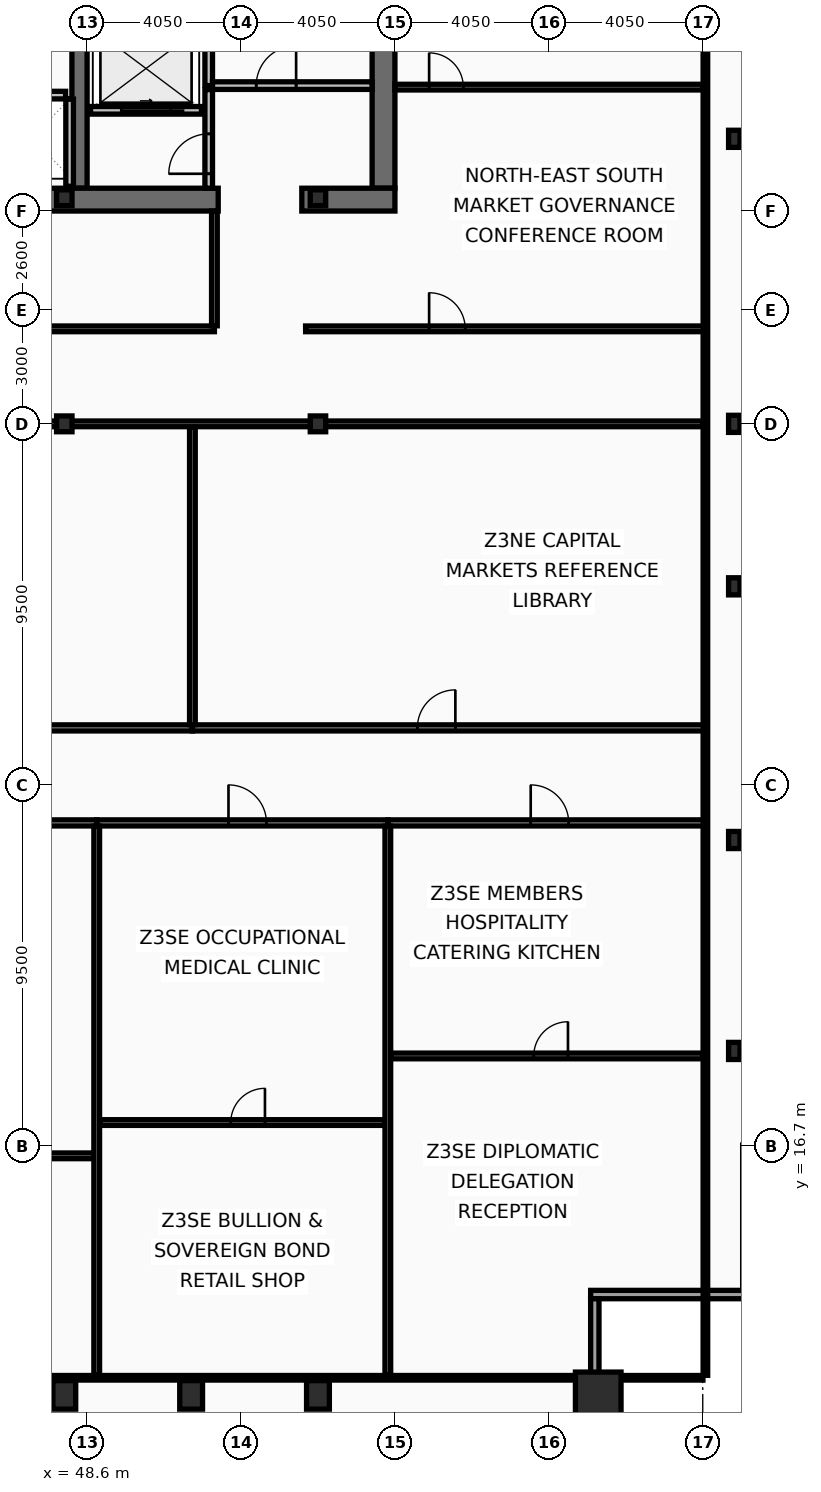
"""IFC4 building model, lengths in metres.
Left out: names, types, materials, properties, quantities, classifications, styles, units other than length and angle.
Written with IfcOpenShell. Run it as: python <this file> out.ifc"""

import sys

from ifc_helpers import new_model, si_unit, direction, frame, frame_2d, origin, origin_2d, place, context, subcontext, project, spatial, rectangle, hollow_rectangle, i_section, extrude, element, fill, save


model = new_model("IFC4")
c1 = context("Model", 3, precision=1e-05, world=origin(), true_north=direction((0.0, 1.0)))
c2 = subcontext(c1, "Body", "Model", "MODEL_VIEW")
j1 = project(units=[si_unit("LENGTHUNIT", "METRE"), si_unit("PLANEANGLEUNIT", "RADIAN")], contexts=[c1])
p1 = place(None, origin())
s1 = spatial("IfcSite", under=j1, at=p1, CompositionType="ELEMENT")
p2 = place(p1, origin())
s2 = spatial("IfcBuilding", under=s1, at=p2, CompositionType="ELEMENT")
p3 = place(p2, frame((0.0, 0.0, 231.8)))
s3 = spatial("IfcBuildingStorey", under=s2, at=p3, CompositionType="ELEMENT", Elevation=231.8)
p4 = place(p3, frame((56.4, 53.1, 0.0), z_axis=(0.0, 0.0, 1.0), x_axis=(0.0, -1.0, 0.0)))
e1 = element("IfcWall", 1, at=p4, inside=s3, PredefinedType="SHEAR", context=c2, shape_type="SweptSolid", body=[
    extrude(rectangle(XDim=11.2, YDim=0.6, at=frame_2d((5.6, 0.0))), origin(), (0.0, 0.0, 1.0), 3.44),
])
p5 = place(p3, frame((48.4, 41.9, 0.0), z_axis=(0.0, 0.0, 1.0), x_axis=(0.0, 1.0, 0.0)))
e2 = element("IfcWall", 2, at=p5, inside=s3, PredefinedType="SHEAR", context=c2, shape_type="SweptSolid", body=[
    extrude(rectangle(XDim=11.2, YDim=0.4, at=frame_2d((5.6, 0.0))), origin(), (0.0, 0.0, 1.0), 3.44),
])
p6 = place(p3, frame((52.05, 41.6, 0.0), z_axis=(0.0, 0.0, 1.0), x_axis=(-1.0, 0.0, 0.0)))
e3 = element("IfcWall", 3, at=p6, inside=s3, PredefinedType="SHEAR", context=c2, shape_type="SweptSolid", body=[
    extrude(rectangle(XDim=11.3, YDim=0.6, at=frame_2d((5.65, 0.0))), origin(), (0.0, 0.0, 1.0), 3.44),
])
p7 = place(p3, frame((56.7, 41.6, 0.0), z_axis=(0.0, 0.0, 1.0), x_axis=(-1.0, 0.0, 0.0)))
e4 = element("IfcWall", 4, at=p7, inside=s3, PredefinedType="SHEAR", context=c2, shape_type="SweptSolid", body=[
    extrude(rectangle(XDim=2.45, YDim=0.6, at=frame_2d((1.225, 0.0))), origin(), (0.0, 0.0, 1.0), 3.44),
])
p8 = place(p3, frame((62.05, 10.15, 0.0), z_axis=(0.0, 0.0, 1.0), x_axis=(1.0, 0.0, 0.0)))
e5 = element("IfcColumn", 5, at=p8, inside=s3, PredefinedType="COLUMN", context=c2, shape_type="SweptSolid", body=[
    extrude(hollow_rectangle(XDim=1.2, YDim=1.2, WallThickness=0.06, at=origin_2d()), origin(), (0.0, 0.0, 1.0), 3.6),
])
for number, where, z_axis, x_axis in (
    (6, (48.0, 10.15, 0.0), (0.0, 0.0, 1.0), (1.0, 0.0, 0.0)),
    (7, (51.337, 10.15, 0.0), (0.0, 0.0, 1.0), (1.0, 0.0, 0.0)),
    (8, (54.675, 10.15, 0.0), (0.0, 0.0, 1.0), (1.0, 0.0, 0.0)),
):
    element("IfcColumn", number, at=place(p3, frame(where, z_axis=z_axis, x_axis=x_axis)), inside=s3, PredefinedType="COLUMN", context=c2, shape_type="SweptSolid", body=[
        extrude(hollow_rectangle(XDim=0.6, YDim=0.75, WallThickness=0.045, at=origin_2d()), origin(), (0.0, 0.0, 1.0), 3.6),
    ])
for number, where, z_axis, x_axis in (
    (9, (65.63, 19.2, 0.0), (0.0, 0.0, 1.0), (1.0, 0.0, 0.0)),
    (10, (65.63, 24.75, 0.0), (0.0, 0.0, 1.0), (1.0, 0.0, 0.0)),
    (11, (65.63, 31.425, 0.0), (0.0, 0.0, 1.0), (1.0, 0.0, 0.0)),
    (12, (65.63, 35.7, 0.0), (0.0, 0.0, 1.0), (1.0, 0.0, 0.0)),
    (13, (65.63, 43.2, 0.0), (0.0, 0.0, 1.0), (1.0, 0.0, 0.0)),
):
    element("IfcColumn", number, at=place(p3, frame(where, z_axis=z_axis, x_axis=x_axis)), inside=s3, PredefinedType="COLUMN", context=c2, shape_type="SweptSolid", body=[
        extrude(i_section(OverallWidth=0.3, OverallDepth=0.45, WebThickness=0.014, FlangeThickness=0.026, at=origin_2d()), origin(), (0.0, 0.0, 1.0), 3.6),
    ])
for number, where, z_axis, x_axis in (
    (14, (48.0, 35.7, 0.0), (0.0, 0.0, 1.0), (1.0, 0.0, 0.0)),
    (15, (48.0, 41.65, 0.0), (0.0, 0.0, 1.0), (1.0, 0.0, 0.0)),
    (16, (54.675, 35.7, 0.0), (0.0, 0.0, 1.0), (1.0, 0.0, 0.0)),
    (17, (54.675, 41.65, 0.0), (0.0, 0.0, 1.0), (1.0, 0.0, 0.0)),
):
    element("IfcColumn", number, at=place(p3, frame(where, z_axis=z_axis, x_axis=x_axis)), inside=s3, PredefinedType="COLUMN", context=c2, shape_type="SweptSolid", body=[
        extrude(i_section(OverallWidth=0.406, OverallDepth=0.416, WebThickness=0.03, FlangeThickness=0.048, at=origin_2d()), origin(), (0.0, 0.0, 1.0), 3.6),
    ])
p9 = place(p3, frame((66.07, 12.79, 0.0), z_axis=(0.0, 0.0, 1.0), x_axis=(-1.0, 0.0, 0.0)))
e18 = element("IfcWall", 18, at=p9, inside=s3, PredefinedType="SOLIDWALL", context=c2, shape_type="SweptSolid", body=[
    extrude(rectangle(XDim=4.22, YDim=0.22, at=frame_2d((2.11, 0.0))), origin(), (0.0, 0.0, 1.0), 2.83),
])
p10 = place(p3, frame((61.96, 12.68, 0.0), z_axis=(0.0, 0.0, 1.0), x_axis=(0.0, -1.0, 0.0)))
e19 = element("IfcWall", 19, at=p10, inside=s3, PredefinedType="SOLIDWALL", context=c2, shape_type="SweptSolid", body=[
    extrude(rectangle(XDim=3.91, YDim=0.22, at=frame_2d((1.955, 0.0))), origin(), (0.0, 0.0, 1.0), 2.83),
])
p11 = place(p3, frame((51.61, 43.95, 0.0), z_axis=(0.0, 0.0, 1.0), x_axis=(-1.0, 0.0, 0.0)))
e20 = element("IfcWall", 20, at=p11, inside=s3, PredefinedType="PARTITIONING", context=c2, shape_type="SweptSolid", body=[
    extrude(rectangle(XDim=2.92, YDim=0.2, at=frame_2d((1.46, 0.0))), origin(), (0.0, 0.0, 1.0), 3.44),
])
p12 = place(p11, frame((0.81, 0.0, 0.0)))
e21 = element("IfcOpeningElement", 21, at=p12, cuts=e20, PredefinedType="OPENING", context=c2, shape_type="SweptSolid", body=[
    extrude(rectangle(XDim=1.3, YDim=2.18, at=frame_2d((0.65, 1.09))), frame((0.0, 0.11, 0.0), z_axis=(0.0, -1.0, 0.0), x_axis=(1.0, 0.0, 0.0)), (0.0, 0.0, 1.0), 0.22),
])
p13 = place(p3, frame((51.8, 44.6, 0.0), z_axis=(0.0, 0.0, 1.0), x_axis=(0.0, 1.0, 0.0)))
e22 = element("IfcWall", 22, at=p13, inside=s3, PredefinedType="PARTITIONING", context=c2, shape_type="SweptSolid", body=[
    extrude(rectangle(XDim=4.3, YDim=0.2, at=frame_2d((2.15, 0.0))), origin(), (0.0, 0.0, 1.0), 3.44),
])
p14 = place(p3, frame((51.9, 44.6, 0.0), z_axis=(0.0, 0.0, 1.0), x_axis=(1.0, 0.0, 0.0)))
e23 = element("IfcWall", 23, at=p14, inside=s3, PredefinedType="PARTITIONING", context=c2, shape_type="SweptSolid", body=[
    extrude(rectangle(XDim=4.2, YDim=0.2, at=frame_2d((2.1, 0.0))), origin(), (0.0, 0.0, 1.0), 3.44),
])
p15 = place(p14, frame((1.15, 0.0, 0.0)))
e24 = element("IfcOpeningElement", 24, at=p15, cuts=e23, PredefinedType="OPENING", context=c2, shape_type="SweptSolid", body=[
    extrude(rectangle(XDim=1.05, YDim=2.15, at=frame_2d((0.525, 1.075))), frame((0.0, 0.11, 0.0), z_axis=(0.0, -1.0, 0.0), x_axis=(1.0, 0.0, 0.0)), (0.0, 0.0, 1.0), 0.22),
])
p16 = place(p3, frame((51.8, 41.9, 0.0), z_axis=(0.0, 0.0, 1.0), x_axis=(0.0, 1.0, 0.0)))
e25 = element("IfcWall", 25, at=p16, inside=s3, PredefinedType="PARTITIONING", context=c2, shape_type="SweptSolid", body=[
    extrude(rectangle(XDim=2.595, YDim=0.2, at=frame_2d((1.298, 0.0))), origin(), (0.0, 0.0, 1.0), 3.44),
])
p17 = place(p16, frame((0.38, 0.0, 0.0)))
e26 = element("IfcOpeningElement", 26, at=p17, cuts=e25, PredefinedType="OPENING", context=c2, shape_type="SweptSolid", body=[
    extrude(rectangle(XDim=1.05, YDim=2.15, at=frame_2d((0.525, 1.075))), frame((0.0, 0.11, 0.0), z_axis=(0.0, -1.0, 0.0), x_axis=(1.0, 0.0, 0.0)), (0.0, 0.0, 1.0), 0.22),
])
p18 = place(p3, frame((41.825, 44.35, 0.0), z_axis=(0.0, 0.0, 1.0), x_axis=(1.0, 0.0, 0.0)))
e27 = element("IfcWall", 27, at=p18, inside=s3, PredefinedType="PARTITIONING", context=c2, shape_type="SweptSolid", body=[
    extrude(rectangle(XDim=6.21, YDim=0.2, at=frame_2d((3.105, 0.0))), origin(), (0.0, 0.0, 1.0), 3.44),
])
p19 = place(p3, frame((48.14, 41.95, 0.0), z_axis=(0.0, 0.0, 1.0), x_axis=(0.0, 1.0, 0.0)))
e28 = element("IfcWall", 28, at=p19, inside=s3, PredefinedType="PARTITIONING", context=c2, shape_type="SweptSolid", body=[
    extrude(rectangle(XDim=2.295, YDim=0.2, at=frame_2d((1.147, 0.0))), origin(), (0.0, 0.0, 1.0), 3.44),
])
p20 = place(p3, frame((44.8, 38.2, 0.0), z_axis=(0.0, 0.0, 1.0), x_axis=(1.0, 0.0, 0.0)))
e29 = element("IfcWall", 29, at=p20, inside=s3, PredefinedType="PARTITIONING", context=c2, shape_type="SweptSolid", body=[
    extrude(rectangle(XDim=7.15, YDim=0.15, at=frame_2d((3.575, 0.0))), origin(), (0.0, 0.0, 1.0), 2.78),
])
p21 = place(p20, frame((1.1, 0.0, 0.0)))
e30 = element("IfcOpeningElement", 30, at=p21, cuts=e29, PredefinedType="OPENING", context=c2, shape_type="SweptSolid", body=[
    extrude(rectangle(XDim=1.0, YDim=2.05, at=frame_2d((0.5, 1.025))), frame((0.0, 0.085, 0.0), z_axis=(0.0, -1.0, 0.0), x_axis=(1.0, 0.0, 0.0)), (0.0, 0.0, 1.0), 0.17),
])
p22 = place(p3, frame((51.95, 38.28, 0.0), z_axis=(0.0, 0.0, 1.0), x_axis=(0.0, 1.0, 0.0)))
e31 = element("IfcWall", 31, at=p22, inside=s3, PredefinedType="PARTITIONING", context=c2, shape_type="SweptSolid", body=[
    extrude(rectangle(XDim=3.02, YDim=0.15, at=frame_2d((1.51, 0.0))), origin(), (0.0, 0.0, 1.0), 3.44),
])
p23 = place(p3, frame((54.35, 38.2, 0.0), z_axis=(0.0, 0.0, 1.0), x_axis=(1.0, 0.0, 0.0)))
e32 = element("IfcWall", 32, at=p23, inside=s3, PredefinedType="PARTITIONING", context=c2, shape_type="SweptSolid", body=[
    extrude(rectangle(XDim=10.52, YDim=0.15, at=frame_2d((5.26, 0.0))), origin(), (0.0, 0.0, 1.0), 2.78),
])
p24 = place(p23, frame((3.25, 0.0, 0.0)))
e33 = element("IfcOpeningElement", 33, at=p24, cuts=e32, PredefinedType="OPENING", context=c2, shape_type="SweptSolid", body=[
    extrude(rectangle(XDim=0.95, YDim=2.05, at=frame_2d((0.475, 1.025))), frame((0.0, 0.085, 0.0), z_axis=(0.0, -1.0, 0.0), x_axis=(1.0, 0.0, 0.0)), (0.0, 0.0, 1.0), 0.17),
])
p25 = place(p3, frame((56.7, 44.56, 0.0), z_axis=(0.0, 0.0, 1.0), x_axis=(1.0, 0.0, 0.0)))
e34 = element("IfcWall", 34, at=p25, inside=s3, PredefinedType="PARTITIONING", context=c2, shape_type="SweptSolid", body=[
    extrude(rectangle(XDim=8.105, YDim=0.15, at=frame_2d((4.052, 0.0))), origin(), (0.0, 0.0, 1.0), 2.83),
])
p26 = place(p25, frame((0.9, 0.0, 0.0)))
e35 = element("IfcOpeningElement", 35, at=p26, cuts=e34, PredefinedType="OPENING", context=c2, shape_type="SweptSolid", body=[
    extrude(rectangle(XDim=0.9, YDim=2.05, at=frame_2d((0.45, 1.025))), frame((0.0, 0.085, 0.0), z_axis=(0.0, -1.0, 0.0), x_axis=(1.0, 0.0, 0.0)), (0.0, 0.0, 1.0), 0.17),
])
p27 = place(p3, frame((39.88, 35.7, 0.0), z_axis=(0.0, 0.0, 1.0), x_axis=(1.0, 0.0, 0.0)))
e36 = element("IfcWall", 36, at=p27, inside=s3, PredefinedType="PARTITIONING", context=c2, shape_type="SweptSolid", body=[
    extrude(rectangle(XDim=24.925, YDim=0.15, at=frame_2d((12.462, 0.0))), origin(), (0.0, 0.0, 1.0), 2.78),
])
p28 = place(p3, frame((39.8, 25.2, 0.0), z_axis=(0.0, 0.0, 1.0), x_axis=(1.0, 0.0, 0.0)))
e37 = element("IfcWall", 37, at=p28, inside=s3, PredefinedType="PARTITIONING", context=c2, shape_type="SweptSolid", body=[
    extrude(rectangle(XDim=9.053, YDim=0.16, at=frame_2d((4.526, 0.0))), origin(), (0.0, 0.0, 1.0), 2.78),
])
p29 = place(p28, frame((4.052, 0.0, 0.0)))
e38 = element("IfcOpeningElement", 38, at=p29, cuts=e37, PredefinedType="OPENING", context=c2, shape_type="SweptSolid", body=[
    extrude(rectangle(XDim=1.0, YDim=2.05, at=frame_2d((0.5, 1.025))), frame((0.0, 0.09, 0.0), z_axis=(0.0, -1.0, 0.0), x_axis=(1.0, 0.0, 0.0)), (0.0, 0.0, 1.0), 0.18),
])
p30 = place(p3, frame((39.88, 16.44, 0.0), z_axis=(0.0, 0.0, 1.0), x_axis=(1.0, 0.0, 0.0)))
e39 = element("IfcWall", 39, at=p30, inside=s3, PredefinedType="PARTITIONING", context=c2, shape_type="SweptSolid", body=[
    extrude(rectangle(XDim=8.893, YDim=0.15, at=frame_2d((4.447, 0.0))), origin(), (0.0, 0.0, 1.0), 2.78),
])
p31 = place(p30, frame((4.074, 0.0, 0.0)))
e40 = element("IfcOpeningElement", 40, at=p31, cuts=e39, PredefinedType="OPENING", context=c2, shape_type="SweptSolid", body=[
    extrude(rectangle(XDim=0.9, YDim=2.05, at=frame_2d((0.45, 1.025))), frame((0.0, 0.085, 0.0), z_axis=(0.0, -1.0, 0.0), x_axis=(1.0, 0.0, 0.0)), (0.0, 0.0, 1.0), 0.17),
])
p32 = place(p3, frame((48.853, 25.2, 0.0), z_axis=(0.0, 0.0, 1.0), x_axis=(1.0, 0.0, 0.0)))
e41 = element("IfcWall", 41, at=p32, inside=s3, PredefinedType="PARTITIONING", context=c2, shape_type="SweptSolid", body=[
    extrude(rectangle(XDim=7.66, YDim=0.16, at=frame_2d((3.83, 0.0))), origin(), (0.0, 0.0, 1.0), 2.78),
])
p33 = place(p32, frame((3.467, 0.0, 0.0)))
e42 = element("IfcOpeningElement", 42, at=p33, cuts=e41, PredefinedType="OPENING", context=c2, shape_type="SweptSolid", body=[
    extrude(rectangle(XDim=1.0, YDim=2.05, at=frame_2d((0.5, 1.025))), frame((0.0, 0.09, 0.0), z_axis=(0.0, -1.0, 0.0), x_axis=(1.0, 0.0, 0.0)), (0.0, 0.0, 1.0), 0.18),
])
p34 = place(p3, frame((48.853, 10.665, 0.0), z_axis=(0.0, 0.0, 1.0), x_axis=(0.0, 1.0, 0.0)))
e43 = element("IfcWall", 43, at=p34, inside=s3, PredefinedType="PARTITIONING", context=c2, shape_type="SweptSolid", body=[
    extrude(rectangle(XDim=14.45, YDim=0.15, at=frame_2d((7.225, 0.0))), origin(), (0.0, 0.0, 1.0), 2.98),
])
p35 = place(p3, frame((48.933, 17.316, 0.0), z_axis=(0.0, 0.0, 1.0), x_axis=(1.0, 0.0, 0.0)))
e44 = element("IfcWall", 44, at=p35, inside=s3, PredefinedType="PARTITIONING", context=c2, shape_type="SweptSolid", body=[
    extrude(rectangle(XDim=7.5, YDim=0.15, at=frame_2d((3.75, 0.0))), origin(), (0.0, 0.0, 1.0), 2.78),
])
p36 = place(p35, frame((3.447, 0.0, 0.0)))
e45 = element("IfcOpeningElement", 45, at=p36, cuts=e44, PredefinedType="OPENING", context=c2, shape_type="SweptSolid", body=[
    extrude(rectangle(XDim=0.9, YDim=2.05, at=frame_2d((0.45, 1.025))), frame((0.0, 0.085, 0.0), z_axis=(0.0, -1.0, 0.0), x_axis=(1.0, 0.0, 0.0)), (0.0, 0.0, 1.0), 0.17),
])
p37 = place(p3, frame((56.513, 25.2, 0.0), z_axis=(0.0, 0.0, 1.0), x_axis=(1.0, 0.0, 0.0)))
e46 = element("IfcWall", 46, at=p37, inside=s3, PredefinedType="PARTITIONING", context=c2, shape_type="SweptSolid", body=[
    extrude(rectangle(XDim=8.357, YDim=0.16, at=frame_2d((4.178, 0.0))), origin(), (0.0, 0.0, 1.0), 3.44),
])
p38 = place(p37, frame((3.76, 0.0, 0.0)))
e47 = element("IfcOpeningElement", 47, at=p38, cuts=e46, PredefinedType="OPENING", context=c2, shape_type="SweptSolid", body=[
    extrude(rectangle(XDim=1.0, YDim=2.05, at=frame_2d((0.5, 1.025))), frame((0.0, 0.09, 0.0), z_axis=(0.0, -1.0, 0.0), x_axis=(1.0, 0.0, 0.0)), (0.0, 0.0, 1.0), 0.18),
])
p39 = place(p3, frame((56.513, 10.665, 0.0), z_axis=(0.0, 0.0, 1.0), x_axis=(0.0, 1.0, 0.0)))
e48 = element("IfcWall", 48, at=p39, inside=s3, PredefinedType="PARTITIONING", context=c2, shape_type="SweptSolid", body=[
    extrude(rectangle(XDim=14.45, YDim=0.15, at=frame_2d((7.225, 0.0))), origin(), (0.0, 0.0, 1.0), 2.78),
])
p40 = place(p3, frame((56.593, 19.068, 0.0), z_axis=(0.0, 0.0, 1.0), x_axis=(1.0, 0.0, 0.0)))
e49 = element("IfcWall", 49, at=p40, inside=s3, PredefinedType="PARTITIONING", context=c2, shape_type="SweptSolid", body=[
    extrude(rectangle(XDim=8.212, YDim=0.15, at=frame_2d((4.106, 0.0))), origin(), (0.0, 0.0, 1.0), 2.78),
])
p41 = place(p40, frame((3.76, 0.0, 0.0)))
e50 = element("IfcOpeningElement", 50, at=p41, cuts=e49, PredefinedType="OPENING", context=c2, shape_type="SweptSolid", body=[
    extrude(rectangle(XDim=0.9, YDim=2.05, at=frame_2d((0.45, 1.025))), frame((0.0, 0.085, 0.0), z_axis=(0.0, -1.0, 0.0), x_axis=(1.0, 0.0, 0.0)), (0.0, 0.0, 1.0), 0.17),
])
p42 = place(p3, frame((39.8, 27.7, 0.0), z_axis=(0.0, 0.0, 1.0), x_axis=(1.0, 0.0, 0.0)))
e51 = element("IfcWall", 51, at=p42, inside=s3, PredefinedType="PARTITIONING", context=c2, shape_type="SweptSolid", body=[
    extrude(rectangle(XDim=11.571, YDim=0.16, at=frame_2d((5.785, 0.0))), origin(), (0.0, 0.0, 1.0), 2.78),
])
p43 = place(p42, frame((5.11, 0.0, 0.0)))
e52 = element("IfcOpeningElement", 52, at=p43, cuts=e51, PredefinedType="OPENING", context=c2, shape_type="SweptSolid", body=[
    extrude(rectangle(XDim=1.0, YDim=2.05, at=frame_2d((0.5, 1.025))), frame((0.0, 0.09, 0.0), z_axis=(0.0, -1.0, 0.0), x_axis=(1.0, 0.0, 0.0)), (0.0, 0.0, 1.0), 0.18),
])
p44 = place(p3, frame((51.371, 27.7, 0.0), z_axis=(0.0, 0.0, 1.0), x_axis=(1.0, 0.0, 0.0)))
e53 = element("IfcWall", 53, at=p44, inside=s3, PredefinedType="PARTITIONING", context=c2, shape_type="SweptSolid", body=[
    extrude(rectangle(XDim=13.499, YDim=0.16, at=frame_2d((6.75, 0.0))), origin(), (0.0, 0.0, 1.0), 2.78),
])
p45 = place(p44, frame((5.92, 0.0, 0.0)))
e54 = element("IfcOpeningElement", 54, at=p45, cuts=e53, PredefinedType="OPENING", context=c2, shape_type="SweptSolid", body=[
    extrude(rectangle(XDim=1.0, YDim=2.05, at=frame_2d((0.5, 1.025))), frame((0.0, 0.09, 0.0), z_axis=(0.0, -1.0, 0.0), x_axis=(1.0, 0.0, 0.0)), (0.0, 0.0, 1.0), 0.18),
])
p46 = place(p3, frame((51.371, 27.785, 0.0), z_axis=(0.0, 0.0, 1.0), x_axis=(0.0, 1.0, 0.0)))
e55 = element("IfcWall", 55, at=p46, inside=s3, PredefinedType="PARTITIONING", context=c2, shape_type="SweptSolid", body=[
    extrude(rectangle(XDim=7.835, YDim=0.15, at=frame_2d((3.917, 0.0))), origin(), (0.0, 0.0, 1.0), 2.98),
])
p47 = place(p3, frame((64.87, 10.665, 0.0), z_axis=(0.0, 0.0, 1.0), x_axis=(0.0, 1.0, 0.0)))
e56 = element("IfcWall", 56, at=p47, inside=s3, PredefinedType="PARTITIONING", context=c2, shape_type="SweptSolid", body=[
    extrude(rectangle(XDim=42.11, YDim=0.12, at=frame_2d((21.055, 0.0))), origin(), (0.0, 0.0, 1.0), 2.78),
])
p48 = place(p3, frame((8.095, 10.6, 0.0), z_axis=(0.0, 0.0, 1.0), x_axis=(1.0, 0.0, 0.0)))
e57 = element("IfcWall", 57, at=p48, inside=s3, PredefinedType="PARTITIONING", context=c2, shape_type="SweptSolid", body=[
    extrude(rectangle(XDim=56.71, YDim=0.12, at=frame_2d((28.355, 0.0))), origin(), (0.0, 0.0, 1.0), 2.78),
])
p49 = place(p12, origin())
e58 = element("IfcDoor", 58, at=p49, inside=s3, OperationType="SLIDING_TO_LEFT", PredefinedType="DOOR", context=c2, shape_type="SweptSolid", body=[
    extrude(rectangle(XDim=1.3, YDim=2.18, at=frame_2d((0.65, 1.09))), frame((0.0, 0.025, 0.0), z_axis=(0.0, -1.0, 0.0), x_axis=(1.0, 0.0, 0.0)), (0.0, 0.0, 1.0), 0.05),
])
fill(e21, e58)
p50 = place(p15, origin())
e59 = element("IfcDoor", 59, at=p50, inside=s3, OperationType="SINGLE_SWING_RIGHT", PredefinedType="DOOR", context=c2, shape_type="SweptSolid", body=[
    extrude(rectangle(XDim=1.05, YDim=2.15, at=frame_2d((0.525, 1.075))), frame((0.0, 0.025, 0.0), z_axis=(0.0, -1.0, 0.0), x_axis=(1.0, 0.0, 0.0)), (0.0, 0.0, 1.0), 0.05),
])
fill(e24, e59)
p51 = place(p17, origin())
e60 = element("IfcDoor", 60, at=p51, inside=s3, OperationType="SINGLE_SWING_LEFT", PredefinedType="DOOR", context=c2, shape_type="SweptSolid", body=[
    extrude(rectangle(XDim=1.05, YDim=2.15, at=frame_2d((0.525, 1.075))), frame((0.0, 0.025, 0.0), z_axis=(0.0, -1.0, 0.0), x_axis=(1.0, 0.0, 0.0)), (0.0, 0.0, 1.0), 0.05),
])
fill(e26, e60)
p52 = place(p24, origin())
e61 = element("IfcDoor", 61, at=p52, inside=s3, OperationType="SINGLE_SWING_LEFT", PredefinedType="DOOR", context=c2, shape_type="SweptSolid", body=[
    extrude(rectangle(XDim=0.95, YDim=2.05, at=frame_2d((0.475, 1.025))), frame((0.0, 0.025, 0.0), z_axis=(0.0, -1.0, 0.0), x_axis=(1.0, 0.0, 0.0)), (0.0, 0.0, 1.0), 0.05),
])
fill(e33, e61)
p53 = place(p26, origin())
e62 = element("IfcDoor", 62, at=p53, inside=s3, OperationType="SINGLE_SWING_LEFT", PredefinedType="DOOR", context=c2, shape_type="SweptSolid", body=[
    extrude(rectangle(XDim=0.9, YDim=2.05, at=frame_2d((0.45, 1.025))), frame((0.0, 0.025, 0.0), z_axis=(0.0, -1.0, 0.0), x_axis=(1.0, 0.0, 0.0)), (0.0, 0.0, 1.0), 0.05),
])
fill(e35, e62)
p54 = place(p33, origin())
e63 = element("IfcDoor", 63, at=p54, inside=s3, OperationType="SINGLE_SWING_LEFT", PredefinedType="DOOR", context=c2, shape_type="SweptSolid", body=[
    extrude(rectangle(XDim=1.0, YDim=2.05, at=frame_2d((0.5, 1.025))), frame((0.0, 0.025, 0.0), z_axis=(0.0, -1.0, 0.0), x_axis=(1.0, 0.0, 0.0)), (0.0, 0.0, 1.0), 0.05),
])
fill(e42, e63)
p55 = place(p36, origin())
e64 = element("IfcDoor", 64, at=p55, inside=s3, OperationType="SINGLE_SWING_RIGHT", PredefinedType="DOOR", context=c2, shape_type="SweptSolid", body=[
    extrude(rectangle(XDim=0.9, YDim=2.05, at=frame_2d((0.45, 1.025))), frame((0.0, 0.025, 0.0), z_axis=(0.0, -1.0, 0.0), x_axis=(1.0, 0.0, 0.0)), (0.0, 0.0, 1.0), 0.05),
])
fill(e45, e64)
p56 = place(p38, origin())
e65 = element("IfcDoor", 65, at=p56, inside=s3, OperationType="SINGLE_SWING_LEFT", PredefinedType="DOOR", context=c2, shape_type="SweptSolid", body=[
    extrude(rectangle(XDim=1.0, YDim=2.05, at=frame_2d((0.5, 1.025))), frame((0.0, 0.025, 0.0), z_axis=(0.0, -1.0, 0.0), x_axis=(1.0, 0.0, 0.0)), (0.0, 0.0, 1.0), 0.05),
])
fill(e47, e65)
p57 = place(p41, origin())
e66 = element("IfcDoor", 66, at=p57, inside=s3, OperationType="SINGLE_SWING_RIGHT", PredefinedType="DOOR", context=c2, shape_type="SweptSolid", body=[
    extrude(rectangle(XDim=0.9, YDim=2.05, at=frame_2d((0.45, 1.025))), frame((0.0, 0.025, 0.0), z_axis=(0.0, -1.0, 0.0), x_axis=(1.0, 0.0, 0.0)), (0.0, 0.0, 1.0), 0.05),
])
fill(e50, e66)
p58 = place(p45, origin())
e67 = element("IfcDoor", 67, at=p58, inside=s3, OperationType="SINGLE_SWING_RIGHT", PredefinedType="DOOR", context=c2, shape_type="SweptSolid", body=[
    extrude(rectangle(XDim=1.0, YDim=2.05, at=frame_2d((0.5, 1.025))), frame((0.0, 0.025, 0.0), z_axis=(0.0, -1.0, 0.0), x_axis=(1.0, 0.0, 0.0)), (0.0, 0.0, 1.0), 0.05),
])
fill(e54, e67)
save(model, sys.argv[1])
